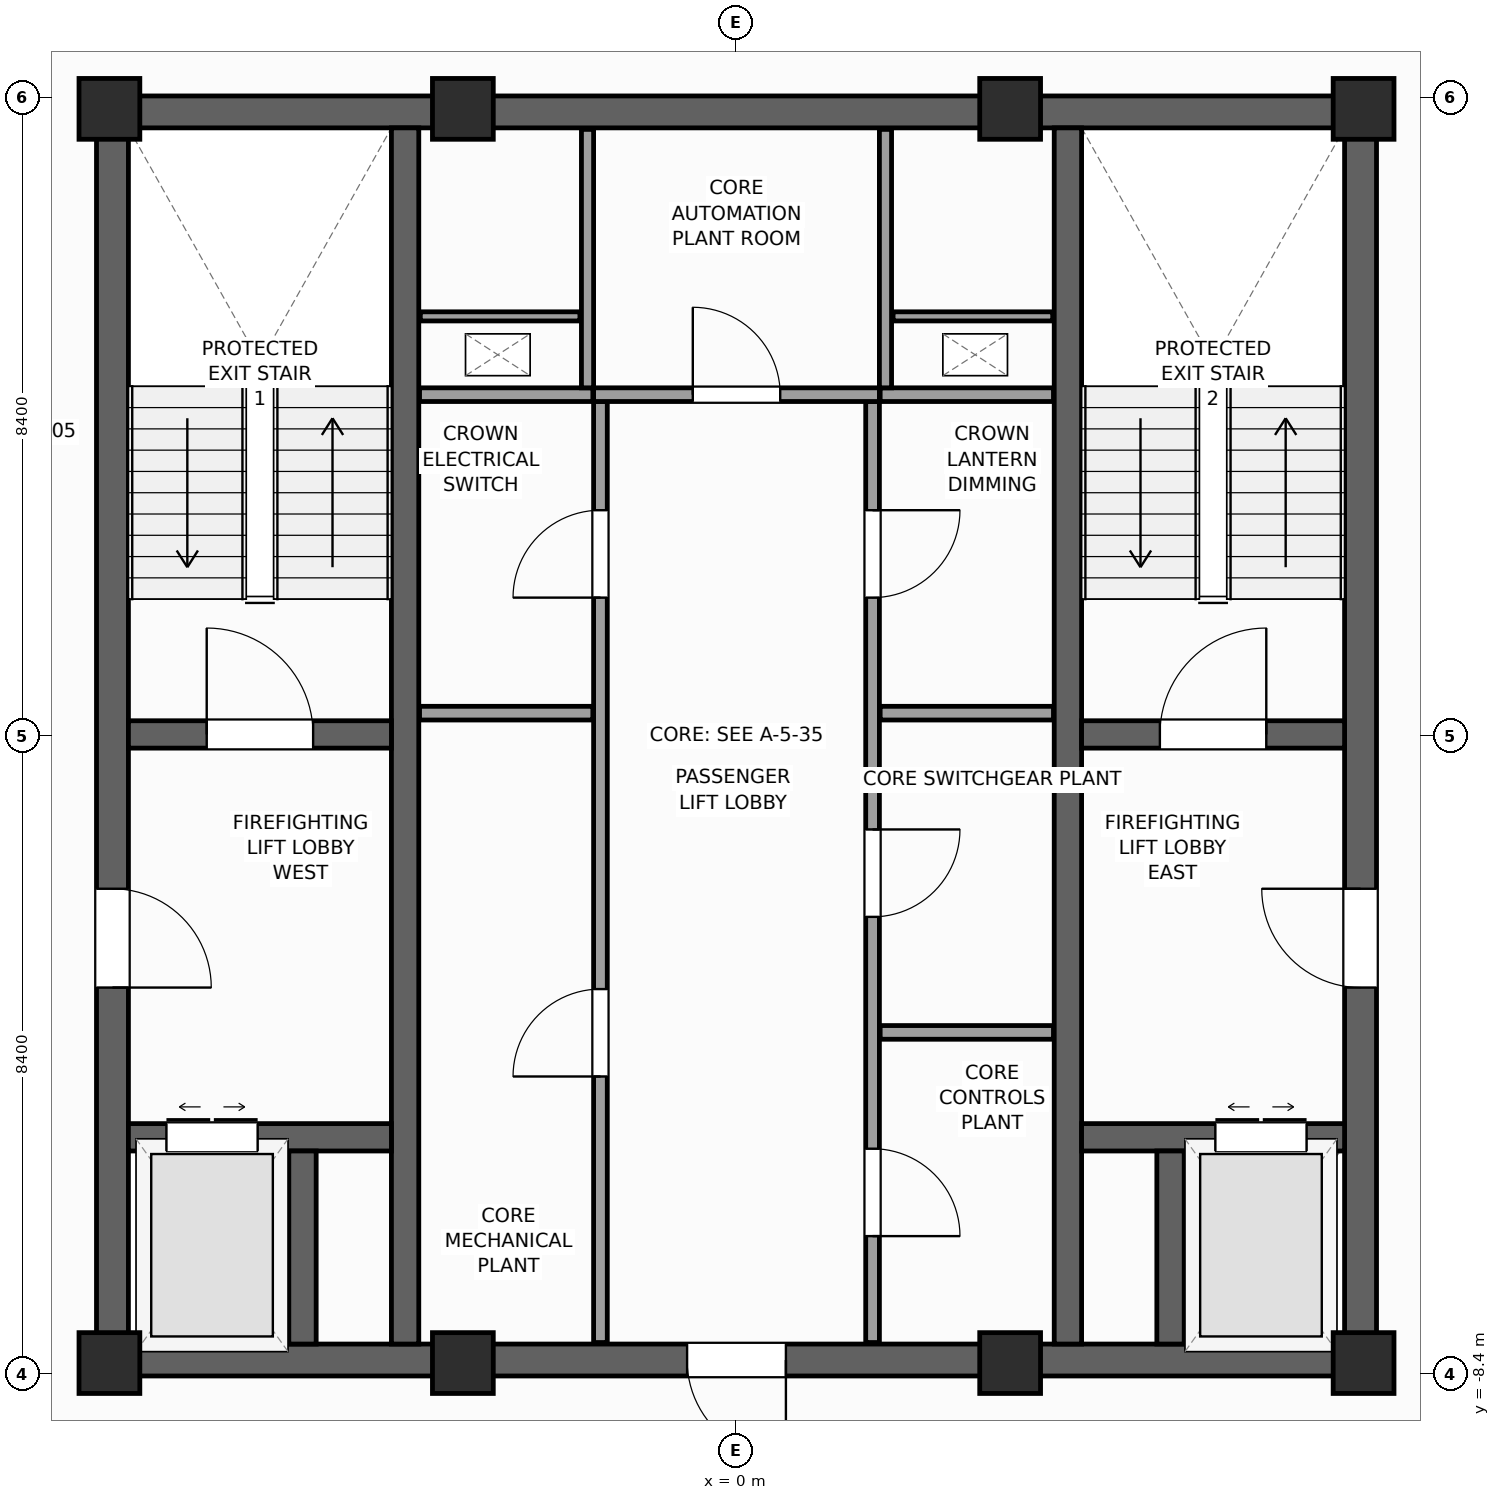
"""IFC4 building model, lengths in metres.
Left out: names, types, materials, properties, quantities, classifications, styles, units other than length and angle.
Written with IfcOpenShell. Run it as: python <this file> out.ifc"""

import sys

from ifc_helpers import new_model, si_unit, direction, frame, frame_2d, origin, origin_2d, place, context, subcontext, project, spatial, rectangle, extrude, source, transform, mapped, element, fill, save


model = new_model("IFC4")
c1 = context("Model", 3, precision=1e-05, world=origin(), true_north=direction((0.0, 1.0)))
c2 = subcontext(c1, "Body", "Model", "MODEL_VIEW")
j1 = project(units=[si_unit("LENGTHUNIT", "METRE"), si_unit("PLANEANGLEUNIT", "RADIAN")], contexts=[c1])
p1 = place(None, origin())
s1 = spatial("IfcSite", under=j1, at=p1, CompositionType="ELEMENT")
p2 = place(p1, origin())
s2 = spatial("IfcBuilding", under=s1, at=p2, CompositionType="ELEMENT")
p3 = place(p2, frame((0.0, 0.0, 333.6)))
s3 = spatial("IfcBuildingStorey", under=s2, at=p3, CompositionType="ELEMENT", Elevation=333.6)
p4 = place(p3, frame((-8.42, -8.21, 0.0), z_axis=(0.0, 0.0, 1.0), x_axis=(1.0, 0.0, 0.0)))
e1 = element("IfcWall", 1, at=p4, inside=s3, PredefinedType="SHEAR", context=c2, shape_type="SweptSolid", body=[
    extrude(rectangle(XDim=16.84, YDim=0.42, at=frame_2d((8.42, 0.0))), origin(), (0.0, 0.0, 1.0), 4.0),
])
p5 = place(p4, frame((7.77, 0.0, 0.0)))
e2 = element("IfcOpeningElement", 2, at=p5, cuts=e1, PredefinedType="OPENING", context=c2, shape_type="SweptSolid", body=[
    extrude(rectangle(XDim=1.3, YDim=2.2, at=frame_2d((0.65, 1.1))), frame((0.0, 0.22, 0.0), z_axis=(0.0, -1.0, 0.0), x_axis=(1.0, 0.0, 0.0)), (0.0, 0.0, 1.0), 0.44),
])
p6 = place(p3, frame((-8.42, 8.21, 0.0), z_axis=(0.0, 0.0, 1.0), x_axis=(1.0, 0.0, 0.0)))
e3 = element("IfcWall", 3, at=p6, inside=s3, PredefinedType="SHEAR", context=c2, shape_type="SweptSolid", body=[
    extrude(rectangle(XDim=16.84, YDim=0.42, at=frame_2d((8.42, 0.0))), origin(), (0.0, 0.0, 1.0), 4.0),
])
p7 = place(p3, frame((-8.21, -8.0, 0.0), z_axis=(0.0, 0.0, 1.0), x_axis=(0.0, 1.0, 0.0)))
e4 = element("IfcWall", 4, at=p7, inside=s3, PredefinedType="SHEAR", context=c2, shape_type="SweptSolid", body=[
    extrude(rectangle(XDim=16.0, YDim=0.42, at=frame_2d((8.0, 0.0))), origin(), (0.0, 0.0, 1.0), 4.0),
])
p8 = place(p7, frame((4.69, 0.0, 0.0)))
e5 = element("IfcOpeningElement", 5, at=p8, cuts=e4, PredefinedType="OPENING", context=c2, shape_type="SweptSolid", body=[
    extrude(rectangle(XDim=1.3, YDim=2.2, at=frame_2d((0.65, 1.1))), frame((0.0, 0.22, 0.0), z_axis=(0.0, -1.0, 0.0), x_axis=(1.0, 0.0, 0.0)), (0.0, 0.0, 1.0), 0.44),
])
p9 = place(p3, frame((8.21, -8.0, 0.0), z_axis=(0.0, 0.0, 1.0), x_axis=(0.0, 1.0, 0.0)))
e6 = element("IfcWall", 6, at=p9, inside=s3, PredefinedType="SHEAR", context=c2, shape_type="SweptSolid", body=[
    extrude(rectangle(XDim=16.0, YDim=0.42, at=frame_2d((8.0, 0.0))), origin(), (0.0, 0.0, 1.0), 4.0),
])
p10 = place(p9, frame((4.69, 0.0, 0.0)))
e7 = element("IfcOpeningElement", 7, at=p10, cuts=e6, PredefinedType="OPENING", context=c2, shape_type="SweptSolid", body=[
    extrude(rectangle(XDim=1.3, YDim=2.2, at=frame_2d((0.65, 1.1))), frame((0.0, 0.22, 0.0), z_axis=(0.0, -1.0, 0.0), x_axis=(1.0, 0.0, 0.0)), (0.0, 0.0, 1.0), 0.44),
])
for number, where, z_axis, x_axis in (
    (8, (-4.36, -8.0, 0.0), (0.0, 0.0, 1.0), (0.0, 1.0, 0.0)),
    (9, (4.36, -8.0, 0.0), (0.0, 0.0, 1.0), (0.0, 1.0, 0.0)),
):
    element("IfcWall", number, at=place(p3, frame(where, z_axis=z_axis, x_axis=x_axis)), inside=s3, PredefinedType="SHEAR", context=c2, shape_type="SweptSolid", body=[
        extrude(rectangle(XDim=16.0, YDim=0.36, at=frame_2d((8.0, 0.0))), origin(), (0.0, 0.0, 1.0), 4.0),
    ])
p11 = place(p3, frame((-8.0, 0.02, 0.0), z_axis=(0.0, 0.0, 1.0), x_axis=(1.0, 0.0, 0.0)))
e10 = element("IfcWall", 10, at=p11, inside=s3, PredefinedType="SHEAR", context=c2, shape_type="SweptSolid", body=[
    extrude(rectangle(XDim=3.46, YDim=0.36, at=frame_2d((1.73, 0.0))), origin(), (0.0, 0.0, 1.0), 4.0),
])
p12 = place(p11, frame((1.03, 0.0, 0.0)))
e11 = element("IfcOpeningElement", 11, at=p12, cuts=e10, PredefinedType="OPENING", context=c2, shape_type="SweptSolid", body=[
    extrude(rectangle(XDim=1.4, YDim=2.2, at=frame_2d((0.7, 1.1))), frame((0.0, 0.19, 0.0), z_axis=(0.0, -1.0, 0.0), x_axis=(1.0, 0.0, 0.0)), (0.0, 0.0, 1.0), 0.38),
])
p13 = place(p3, frame((4.54, 0.02, 0.0), z_axis=(0.0, 0.0, 1.0), x_axis=(1.0, 0.0, 0.0)))
e12 = element("IfcWall", 12, at=p13, inside=s3, PredefinedType="SHEAR", context=c2, shape_type="SweptSolid", body=[
    extrude(rectangle(XDim=3.46, YDim=0.36, at=frame_2d((1.73, 0.0))), origin(), (0.0, 0.0, 1.0), 4.0),
])
p14 = place(p13, frame((1.03, 0.0, 0.0)))
e13 = element("IfcOpeningElement", 13, at=p14, cuts=e12, PredefinedType="OPENING", context=c2, shape_type="SweptSolid", body=[
    extrude(rectangle(XDim=1.4, YDim=2.2, at=frame_2d((0.7, 1.1))), frame((0.0, 0.19, 0.0), z_axis=(0.0, -1.0, 0.0), x_axis=(1.0, 0.0, 0.0)), (0.0, 0.0, 1.0), 0.38),
])
p15 = place(p3, frame((-8.0, -5.28, 0.0), z_axis=(0.0, 0.0, 1.0), x_axis=(1.0, 0.0, 0.0)))
e14 = element("IfcWall", 14, at=p15, inside=s3, PredefinedType="SHEAR", context=c2, shape_type="SweptSolid", body=[
    extrude(rectangle(XDim=3.46, YDim=0.36, at=frame_2d((1.73, 0.0))), origin(), (0.0, 0.0, 1.0), 4.0),
])
p16 = place(p15, frame((0.5, 0.0, 0.0)))
e15 = element("IfcOpeningElement", 15, at=p16, cuts=e14, PredefinedType="OPENING", context=c2, shape_type="SweptSolid", body=[
    extrude(rectangle(XDim=1.2, YDim=2.25, at=frame_2d((0.6, 1.125))), frame((0.0, 0.19, 0.0), z_axis=(0.0, -1.0, 0.0), x_axis=(1.0, 0.0, 0.0)), (0.0, 0.0, 1.0), 0.38),
])
p17 = place(p3, frame((4.54, -5.28, 0.0), z_axis=(0.0, 0.0, 1.0), x_axis=(1.0, 0.0, 0.0)))
e16 = element("IfcWall", 16, at=p17, inside=s3, PredefinedType="SHEAR", context=c2, shape_type="SweptSolid", body=[
    extrude(rectangle(XDim=3.46, YDim=0.36, at=frame_2d((1.73, 0.0))), origin(), (0.0, 0.0, 1.0), 4.0),
])
p18 = place(p17, frame((1.76, 0.0, 0.0)))
e17 = element("IfcOpeningElement", 17, at=p18, cuts=e16, PredefinedType="OPENING", context=c2, shape_type="SweptSolid", body=[
    extrude(rectangle(XDim=1.2, YDim=2.25, at=frame_2d((0.6, 1.125))), frame((0.0, 0.19, 0.0), z_axis=(0.0, -1.0, 0.0), x_axis=(1.0, 0.0, 0.0)), (0.0, 0.0, 1.0), 0.38),
])
for number, where, z_axis, x_axis in (
    (18, (-5.71, -8.0, 0.0), (0.0, 0.0, 1.0), (0.0, 1.0, 0.0)),
    (19, (5.71, -8.0, 0.0), (0.0, 0.0, 1.0), (0.0, 1.0, 0.0)),
):
    element("IfcWall", number, at=place(p3, frame(where, z_axis=z_axis, x_axis=x_axis)), inside=s3, PredefinedType="SHEAR", context=c2, shape_type="SweptSolid", body=[
        extrude(rectangle(XDim=2.54, YDim=0.36, at=frame_2d((1.27, 0.0))), origin(), (0.0, 0.0, 1.0), 4.0),
    ])
m1 = source(origin(), c2, "Body", "SweptSolid", [
    extrude(rectangle(XDim=0.8, YDim=0.8, at=origin_2d()), origin(), (0.0, 0.0, 1.0), 4.0),
])
for number, where, z_axis, x_axis in (
    (20, (-8.25, -8.25, 0.0), (0.0, 0.0, 1.0), (1.0, 0.0, 0.0)),
    (21, (8.25, -8.25, 0.0), (0.0, 0.0, 1.0), (1.0, 0.0, 0.0)),
    (22, (8.25, 8.25, 0.0), (0.0, 0.0, 1.0), (1.0, 0.0, 0.0)),
    (23, (-8.25, 8.25, 0.0), (0.0, 0.0, 1.0), (1.0, 0.0, 0.0)),
    (24, (-3.6, -8.25, 0.0), (0.0, 0.0, 1.0), (1.0, 0.0, 0.0)),
    (25, (3.6, -8.25, 0.0), (0.0, 0.0, 1.0), (1.0, 0.0, 0.0)),
    (26, (-3.6, 8.25, 0.0), (0.0, 0.0, 1.0), (1.0, 0.0, 0.0)),
    (27, (3.6, 8.25, 0.0), (0.0, 0.0, 1.0), (1.0, 0.0, 0.0)),
):
    element("IfcColumn", number, at=place(p3, frame(where, z_axis=z_axis, x_axis=x_axis)), inside=s3, PredefinedType="PILASTER", context=c2, shape_type="MappedRepresentation", body=[
        mapped(m1, transform((0.0, 0.0, 0.0), scale=1.0)),
    ])
p19 = place(p3, frame((-1.79, -7.98, 0.0), z_axis=(0.0, 0.0, 1.0), x_axis=(0.0, 1.0, 0.0)))
e28 = element("IfcWall", 28, at=p19, inside=s3, PredefinedType="PARTITIONING", context=c2, shape_type="SweptSolid", body=[
    extrude(rectangle(XDim=12.38, YDim=0.18, at=frame_2d((6.19, 0.0))), origin(), (0.0, 0.0, 1.0), 3.7),
])
p20 = place(p19, frame((3.5, 0.0, 0.0)))
e29 = element("IfcOpeningElement", 29, at=p20, cuts=e28, PredefinedType="OPENING", context=c2, shape_type="SweptSolid", body=[
    extrude(rectangle(XDim=1.15, YDim=2.25, at=frame_2d((0.575, 1.125))), frame((0.0, 0.1, 0.0), z_axis=(0.0, -1.0, 0.0), x_axis=(1.0, 0.0, 0.0)), (0.0, 0.0, 1.0), 0.2),
])
p21 = place(p19, frame((9.8, 0.0, 0.0)))
e30 = element("IfcOpeningElement", 30, at=p21, cuts=e28, PredefinedType="OPENING", context=c2, shape_type="SweptSolid", body=[
    extrude(rectangle(XDim=1.15, YDim=2.25, at=frame_2d((0.575, 1.125))), frame((0.0, 0.1, 0.0), z_axis=(0.0, -1.0, 0.0), x_axis=(1.0, 0.0, 0.0)), (0.0, 0.0, 1.0), 0.2),
])
p22 = place(p3, frame((1.79, -7.98, 0.0), z_axis=(0.0, 0.0, 1.0), x_axis=(0.0, 1.0, 0.0)))
e31 = element("IfcWall", 31, at=p22, inside=s3, PredefinedType="PARTITIONING", context=c2, shape_type="SweptSolid", body=[
    extrude(rectangle(XDim=12.38, YDim=0.18, at=frame_2d((6.19, 0.0))), origin(), (0.0, 0.0, 1.0), 3.7),
])
p23 = place(p22, frame((1.4, 0.0, 0.0)))
e32 = element("IfcOpeningElement", 32, at=p23, cuts=e31, PredefinedType="OPENING", context=c2, shape_type="SweptSolid", body=[
    extrude(rectangle(XDim=1.15, YDim=2.25, at=frame_2d((0.575, 1.125))), frame((0.0, 0.1, 0.0), z_axis=(0.0, -1.0, 0.0), x_axis=(1.0, 0.0, 0.0)), (0.0, 0.0, 1.0), 0.2),
])
p24 = place(p22, frame((5.6, 0.0, 0.0)))
e33 = element("IfcOpeningElement", 33, at=p24, cuts=e31, PredefinedType="OPENING", context=c2, shape_type="SweptSolid", body=[
    extrude(rectangle(XDim=1.15, YDim=2.25, at=frame_2d((0.575, 1.125))), frame((0.0, 0.1, 0.0), z_axis=(0.0, -1.0, 0.0), x_axis=(1.0, 0.0, 0.0)), (0.0, 0.0, 1.0), 0.2),
])
p25 = place(p22, frame((9.8, 0.0, 0.0)))
e34 = element("IfcOpeningElement", 34, at=p25, cuts=e31, PredefinedType="OPENING", context=c2, shape_type="SweptSolid", body=[
    extrude(rectangle(XDim=1.15, YDim=2.25, at=frame_2d((0.575, 1.125))), frame((0.0, 0.1, 0.0), z_axis=(0.0, -1.0, 0.0), x_axis=(1.0, 0.0, 0.0)), (0.0, 0.0, 1.0), 0.2),
])
p26 = place(p3, frame((-1.88, 4.49, 0.0), z_axis=(0.0, 0.0, 1.0), x_axis=(1.0, 0.0, 0.0)))
e35 = element("IfcWall", 35, at=p26, inside=s3, PredefinedType="PARTITIONING", context=c2, shape_type="SweptSolid", body=[
    extrude(rectangle(XDim=3.76, YDim=0.18, at=frame_2d((1.88, 0.0))), origin(), (0.0, 0.0, 1.0), 3.7),
])
p27 = place(p26, frame((1.305, 0.0, 0.0)))
e36 = element("IfcOpeningElement", 36, at=p27, cuts=e35, PredefinedType="OPENING", context=c2, shape_type="SweptSolid", body=[
    extrude(rectangle(XDim=1.15, YDim=2.25, at=frame_2d((0.575, 1.125))), frame((0.0, 0.1, 0.0), z_axis=(0.0, -1.0, 0.0), x_axis=(1.0, 0.0, 0.0)), (0.0, 0.0, 1.0), 0.2),
])
for number, where, z_axis, x_axis in (
    (37, (1.89, -3.9, 0.0), (0.0, 0.0, 1.0), (1.0, 0.0, 0.0)),
    (38, (-4.17, 0.3, 0.0), (0.0, 0.0, 1.0), (1.0, 0.0, 0.0)),
    (39, (1.89, 0.3, 0.0), (0.0, 0.0, 1.0), (1.0, 0.0, 0.0)),
    (40, (-4.17, 4.49, 0.0), (0.0, 0.0, 1.0), (1.0, 0.0, 0.0)),
    (41, (1.89, 4.49, 0.0), (0.0, 0.0, 1.0), (1.0, 0.0, 0.0)),
):
    element("IfcWall", number, at=place(p3, frame(where, z_axis=z_axis, x_axis=x_axis)), inside=s3, PredefinedType="PARTITIONING", context=c2, shape_type="SweptSolid", body=[
        extrude(rectangle(XDim=2.28, YDim=0.18, at=frame_2d((1.14, 0.0))), origin(), (0.0, 0.0, 1.0), 3.7),
    ])
for number, where, z_axis, x_axis in (
    (42, (-1.96, 4.58, 0.0), (0.0, 0.0, 1.0), (0.0, 1.0, 0.0)),
    (43, (1.96, 4.58, 0.0), (0.0, 0.0, 1.0), (0.0, 1.0, 0.0)),
):
    element("IfcWall", number, at=place(p3, frame(where, z_axis=z_axis, x_axis=x_axis)), inside=s3, PredefinedType="PARTITIONING", context=c2, shape_type="SweptSolid", body=[
        extrude(rectangle(XDim=3.4, YDim=0.16, at=frame_2d((1.7, 0.0))), origin(), (0.0, 0.0, 1.0), 3.7),
    ])
for number, where, z_axis, x_axis in (
    (44, (-4.16, 5.52, 0.0), (0.0, 0.0, 1.0), (1.0, 0.0, 0.0)),
    (45, (2.06, 5.52, 0.0), (0.0, 0.0, 1.0), (1.0, 0.0, 0.0)),
):
    element("IfcWall", number, at=place(p3, frame(where, z_axis=z_axis, x_axis=x_axis)), inside=s3, PredefinedType="PARTITIONING", context=c2, shape_type="SweptSolid", body=[
        extrude(rectangle(XDim=2.1, YDim=0.12, at=frame_2d((1.05, 0.0))), origin(), (0.0, 0.0, 1.0), 3.7),
    ])
m2 = source(origin(), c2, "Body", "SweptSolid", [
    extrude(rectangle(XDim=1.4, YDim=2.2, at=frame_2d((0.7, 1.1))), frame((0.0, 0.025, 0.0), z_axis=(0.0, -1.0, 0.0), x_axis=(1.0, 0.0, 0.0)), (0.0, 0.0, 1.0), 0.05),
])
p28 = place(p12, origin())
e46 = element("IfcDoor", 46, at=p28, inside=s3, OperationType="SINGLE_SWING_LEFT", PredefinedType="DOOR", context=c2, shape_type="MappedRepresentation", body=[
    mapped(m2, transform((0.0, 0.0, 0.0), scale=1.0)),
])
fill(e11, e46)
p29 = place(p14, origin())
e47 = element("IfcDoor", 47, at=p29, inside=s3, OperationType="SINGLE_SWING_RIGHT", PredefinedType="DOOR", context=c2, shape_type="MappedRepresentation", body=[
    mapped(m2, transform((0.0, 0.0, 0.0), scale=1.0)),
])
fill(e13, e47)
m3 = source(origin(), c2, "Body", "SweptSolid", [
    extrude(rectangle(XDim=1.3, YDim=2.2, at=frame_2d((0.65, 1.1))), frame((0.0, 0.025, 0.0), z_axis=(0.0, -1.0, 0.0), x_axis=(1.0, 0.0, 0.0)), (0.0, 0.0, 1.0), 0.05),
])
p30 = place(p8, frame((1.3, 0.0, 0.0), z_axis=(0.0, 0.0, 1.0), x_axis=(-1.0, 0.0, 0.0)))
e48 = element("IfcDoor", 48, at=p30, inside=s3, OperationType="SINGLE_SWING_LEFT", PredefinedType="DOOR", context=c2, shape_type="MappedRepresentation", body=[
    mapped(m3, transform((0.0, 0.0, 0.0), scale=1.0)),
])
fill(e5, e48)
p31 = place(p10, origin())
e49 = element("IfcDoor", 49, at=p31, inside=s3, OperationType="SINGLE_SWING_RIGHT", PredefinedType="DOOR", context=c2, shape_type="MappedRepresentation", body=[
    mapped(m3, transform((0.0, 0.0, 0.0), scale=1.0)),
])
fill(e7, e49)
p32 = place(p5, frame((1.3, 0.0, 0.0), z_axis=(0.0, 0.0, 1.0), x_axis=(-1.0, 0.0, 0.0)))
e50 = element("IfcDoor", 50, at=p32, inside=s3, OperationType="SINGLE_SWING_RIGHT", PredefinedType="DOOR", context=c2, shape_type="MappedRepresentation", body=[
    mapped(m3, transform((0.0, 0.0, 0.0), scale=1.0)),
])
fill(e2, e50)
m4 = source(origin(), c2, "Body", "SweptSolid", [
    extrude(rectangle(XDim=1.2, YDim=2.25, at=frame_2d((0.6, 1.125))), frame((0.0, 0.025, 0.0), z_axis=(0.0, -1.0, 0.0), x_axis=(1.0, 0.0, 0.0)), (0.0, 0.0, 1.0), 0.05),
])
p33 = place(p16, origin())
e51 = element("IfcDoor", 51, at=p33, inside=s3, OperationType="DOUBLE_DOOR_SLIDING", PredefinedType="DOOR", context=c2, shape_type="MappedRepresentation", body=[
    mapped(m4, transform((0.0, 0.0, 0.0), scale=1.0)),
])
fill(e15, e51)
p34 = place(p18, origin())
e52 = element("IfcDoor", 52, at=p34, inside=s3, OperationType="DOUBLE_DOOR_SLIDING", PredefinedType="DOOR", context=c2, shape_type="MappedRepresentation", body=[
    mapped(m4, transform((0.0, 0.0, 0.0), scale=1.0)),
])
fill(e17, e52)
m5 = source(origin(), c2, "Body", "SweptSolid", [
    extrude(rectangle(XDim=1.15, YDim=2.25, at=frame_2d((0.575, 1.125))), frame((0.0, 0.025, 0.0), z_axis=(0.0, -1.0, 0.0), x_axis=(1.0, 0.0, 0.0)), (0.0, 0.0, 1.0), 0.05),
])
p35 = place(p20, origin())
e53 = element("IfcDoor", 53, at=p35, inside=s3, OperationType="SINGLE_SWING_LEFT", PredefinedType="DOOR", context=c2, shape_type="MappedRepresentation", body=[
    mapped(m5, transform((0.0, 0.0, 0.0), scale=1.0)),
])
fill(e29, e53)
p36 = place(p23, frame((1.15, 0.0, 0.0), z_axis=(0.0, 0.0, 1.0), x_axis=(-1.0, 0.0, 0.0)))
e54 = element("IfcDoor", 54, at=p36, inside=s3, OperationType="SINGLE_SWING_LEFT", PredefinedType="DOOR", context=c2, shape_type="MappedRepresentation", body=[
    mapped(m5, transform((0.0, 0.0, 0.0), scale=1.0)),
])
fill(e32, e54)
p37 = place(p24, frame((1.15, 0.0, 0.0), z_axis=(0.0, 0.0, 1.0), x_axis=(-1.0, 0.0, 0.0)))
e55 = element("IfcDoor", 55, at=p37, inside=s3, OperationType="SINGLE_SWING_RIGHT", PredefinedType="DOOR", context=c2, shape_type="MappedRepresentation", body=[
    mapped(m5, transform((0.0, 0.0, 0.0), scale=1.0)),
])
fill(e33, e55)
p38 = place(p21, origin())
e56 = element("IfcDoor", 56, at=p38, inside=s3, OperationType="SINGLE_SWING_LEFT", PredefinedType="DOOR", context=c2, shape_type="MappedRepresentation", body=[
    mapped(m5, transform((0.0, 0.0, 0.0), scale=1.0)),
])
fill(e30, e56)
p39 = place(p25, frame((1.15, 0.0, 0.0), z_axis=(0.0, 0.0, 1.0), x_axis=(-1.0, 0.0, 0.0)))
e57 = element("IfcDoor", 57, at=p39, inside=s3, OperationType="SINGLE_SWING_RIGHT", PredefinedType="DOOR", context=c2, shape_type="MappedRepresentation", body=[
    mapped(m5, transform((0.0, 0.0, 0.0), scale=1.0)),
])
fill(e34, e57)
p40 = place(p27, origin())
e58 = element("IfcDoor", 58, at=p40, inside=s3, OperationType="SINGLE_SWING_LEFT", PredefinedType="DOOR", context=c2, shape_type="MappedRepresentation", body=[
    mapped(m5, transform((0.0, 0.0, 0.0), scale=1.0)),
])
fill(e36, e58)
save(model, sys.argv[1])
